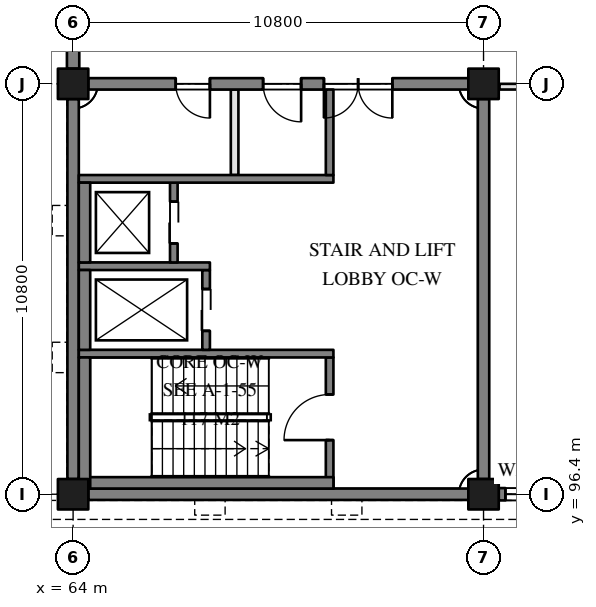
"""IFC4 building model, lengths in metres.
Left out: names, types, materials, properties, quantities, classifications, styles, units other than length and angle.
Written with IfcOpenShell. Run it as: python <this file> out.ifc"""

import sys

from ifc_helpers import new_model, si_unit, direction, frame, frame_2d, origin, origin_2d, place, context, subcontext, project, spatial, rectangle, extrude, element, fill, save


model = new_model("IFC4")
c1 = context("Model", 3, precision=1e-05, world=origin(), true_north=direction((0.0, 1.0)))
c2 = subcontext(c1, "Body", "Model", "MODEL_VIEW")
j1 = project(units=[si_unit("LENGTHUNIT", "METRE"), si_unit("PLANEANGLEUNIT", "RADIAN")], contexts=[c1])
p1 = place(None, origin())
s1 = spatial("IfcSite", under=j1, at=p1, CompositionType="ELEMENT")
p2 = place(p1, origin())
s2 = spatial("IfcBuilding", under=s1, at=p2, CompositionType="ELEMENT")
p3 = place(p2, frame((0.0, 0.0, 12.6)))
s3 = spatial("IfcBuildingStorey", under=s2, at=p3, CompositionType="ELEMENT", Elevation=12.6)
for number, where, z_axis, x_axis in (
    (1, (64.0, 96.4, 0.0), (0.0, 0.0, 1.0), (1.0, 0.0, 0.0)),
    (2, (64.0, 107.2, 0.0), (0.0, 0.0, 1.0), (1.0, 0.0, 0.0)),
    (3, (74.8, 96.4, 0.0), (0.0, 0.0, 1.0), (1.0, 0.0, 0.0)),
    (4, (74.8, 107.2, 0.0), (0.0, 0.0, 1.0), (1.0, 0.0, 0.0)),
):
    element("IfcColumn", number, at=place(p3, frame(where, z_axis=z_axis, x_axis=x_axis)), inside=s3, PredefinedType="COLUMN", context=c2, shape_type="SweptSolid", body=[
        extrude(rectangle(XDim=0.8, YDim=0.8, at=origin_2d()), origin(), (0.0, 0.0, 1.0), 3.9),
    ])
for number, where, z_axis, x_axis in (
    (5, (64.4, 96.4, 0.0), (0.0, 0.0, 1.0), (1.0, 0.0, 0.0)),
    (6, (74.8, 96.8, 0.0), (0.0, 0.0, 1.0), (0.0, 1.0, 0.0)),
):
    element("IfcWall", number, at=place(p3, frame(where, z_axis=z_axis, x_axis=x_axis)), inside=s3, PredefinedType="SOLIDWALL", context=c2, shape_type="SweptSolid", body=[
        extrude(rectangle(XDim=10.0, YDim=0.3, at=frame_2d((5.0, 0.0))), origin(), (0.0, 0.0, 1.0), 3.9),
    ])
p4 = place(p3, frame((74.4, 107.2, 0.0), z_axis=(0.0, 0.0, 1.0), x_axis=(-1.0, 0.0, 0.0)))
e7 = element("IfcWall", 7, at=p4, inside=s3, PredefinedType="SOLIDWALL", context=c2, shape_type="SweptSolid", body=[
    extrude(rectangle(XDim=10.0, YDim=0.3, at=frame_2d((5.0, 0.0))), origin(), (0.0, 0.0, 1.0), 3.9),
])
p5 = place(p4, frame((2.0, 0.0, 0.0)))
e8 = element("IfcOpeningElement", 8, at=p5, cuts=e7, PredefinedType="OPENING", context=c2, shape_type="SweptSolid", body=[
    extrude(rectangle(XDim=1.8, YDim=2.1, at=frame_2d((0.9, 1.05))), frame((0.0, 0.16, 0.0), z_axis=(0.0, -1.0, 0.0), x_axis=(1.0, 0.0, 0.0)), (0.0, 0.0, 1.0), 0.32),
])
p6 = place(p4, frame((4.4, 0.0, 0.0)))
e9 = element("IfcOpeningElement", 9, at=p6, cuts=e7, PredefinedType="OPENING", context=c2, shape_type="SweptSolid", body=[
    extrude(rectangle(XDim=1.0, YDim=2.1, at=frame_2d((0.5, 1.05))), frame((0.0, 0.16, 0.0), z_axis=(0.0, -1.0, 0.0), x_axis=(1.0, 0.0, 0.0)), (0.0, 0.0, 1.0), 0.32),
])
p7 = place(p4, frame((6.8, 0.0, 0.0)))
e10 = element("IfcOpeningElement", 10, at=p7, cuts=e7, PredefinedType="OPENING", context=c2, shape_type="SweptSolid", body=[
    extrude(rectangle(XDim=0.9, YDim=2.1, at=frame_2d((0.45, 1.05))), frame((0.0, 0.16, 0.0), z_axis=(0.0, -1.0, 0.0), x_axis=(1.0, 0.0, 0.0)), (0.0, 0.0, 1.0), 0.32),
])
p8 = place(p3, frame((64.0, 106.8, 0.0), z_axis=(0.0, 0.0, 1.0), x_axis=(0.0, -1.0, 0.0)))
e11 = element("IfcWall", 11, at=p8, inside=s3, PredefinedType="SOLIDWALL", context=c2, shape_type="SweptSolid", body=[
    extrude(rectangle(XDim=10.0, YDim=0.3, at=frame_2d((5.0, 0.0))), origin(), (0.0, 0.0, 1.0), 3.9),
])
p9 = place(p3, frame((75.2, 96.4, 0.0), z_axis=(0.0, 0.0, 1.0), x_axis=(1.0, 0.0, 0.0)))
e12 = element("IfcWall", 12, at=p9, inside=s3, PredefinedType="SOLIDWALL", context=c2, shape_type="SweptSolid", body=[
    extrude(rectangle(XDim=10.0, YDim=0.325, at=frame_2d((5.0, 0.0))), origin(), (0.0, 0.0, 1.0), 2.8),
])
p10 = place(p9, frame((0.175, 0.0, 0.5)))
e13 = element("IfcOpeningElement", 13, at=p10, cuts=e12, PredefinedType="OPENING", context=c2, shape_type="SweptSolid", body=[
    extrude(rectangle(XDim=0.95, YDim=2.25, at=frame_2d((0.475, 1.125))), frame((0.0, 0.172, 0.0), z_axis=(0.0, -1.0, 0.0), x_axis=(1.0, 0.0, 0.0)), (0.0, 0.0, 1.0), 0.345),
])
p11 = place(p9, frame((3.775, 0.0, 0.5)))
e14 = element("IfcOpeningElement", 14, at=p11, cuts=e12, PredefinedType="OPENING", context=c2, shape_type="SweptSolid", body=[
    extrude(rectangle(XDim=0.95, YDim=2.25, at=frame_2d((0.475, 1.125))), frame((0.0, 0.172, 0.0), z_axis=(0.0, -1.0, 0.0), x_axis=(1.0, 0.0, 0.0)), (0.0, 0.0, 1.0), 0.345),
])
p12 = place(p9, frame((7.375, 0.0, 0.5)))
e15 = element("IfcOpeningElement", 15, at=p12, cuts=e12, PredefinedType="OPENING", context=c2, shape_type="SweptSolid", body=[
    extrude(rectangle(XDim=0.95, YDim=2.25, at=frame_2d((0.475, 1.125))), frame((0.0, 0.172, 0.0), z_axis=(0.0, -1.0, 0.0), x_axis=(1.0, 0.0, 0.0)), (0.0, 0.0, 1.0), 0.345),
])
p13 = place(p9, frame((1.675, 0.0, 0.5)))
e16 = element("IfcOpeningElement", 16, at=p13, cuts=e12, PredefinedType="OPENING", context=c2, shape_type="SweptSolid", body=[
    extrude(rectangle(XDim=0.95, YDim=2.25, at=frame_2d((0.475, 1.125))), frame((0.0, 0.172, 0.0), z_axis=(0.0, -1.0, 0.0), x_axis=(1.0, 0.0, 0.0)), (0.0, 0.0, 1.0), 0.345),
])
p14 = place(p9, frame((5.275, 0.0, 0.5)))
e17 = element("IfcOpeningElement", 17, at=p14, cuts=e12, PredefinedType="OPENING", context=c2, shape_type="SweptSolid", body=[
    extrude(rectangle(XDim=0.95, YDim=2.25, at=frame_2d((0.475, 1.125))), frame((0.0, 0.172, 0.0), z_axis=(0.0, -1.0, 0.0), x_axis=(1.0, 0.0, 0.0)), (0.0, 0.0, 1.0), 0.345),
])
p15 = place(p9, frame((8.875, 0.0, 0.5)))
e18 = element("IfcOpeningElement", 18, at=p15, cuts=e12, PredefinedType="OPENING", context=c2, shape_type="SweptSolid", body=[
    extrude(rectangle(XDim=0.95, YDim=2.25, at=frame_2d((0.475, 1.125))), frame((0.0, 0.172, 0.0), z_axis=(0.0, -1.0, 0.0), x_axis=(1.0, 0.0, 0.0)), (0.0, 0.0, 1.0), 0.345),
])
p16 = place(p3, frame((64.0, 107.6, 0.0), z_axis=(0.0, 0.0, 1.0), x_axis=(0.0, 1.0, 0.0)))
e19 = element("IfcWall", 19, at=p16, inside=s3, PredefinedType="SOLIDWALL", context=c2, shape_type="SweptSolid", body=[
    extrude(rectangle(XDim=3.8, YDim=0.325, at=frame_2d((1.9, 0.0))), origin(), (0.0, 0.0, 1.0), 2.8),
])
p17 = place(p16, frame((0.95, 0.0, 0.7)))
e20 = element("IfcOpeningElement", 20, at=p17, cuts=e19, PredefinedType="OPENING", context=c2, shape_type="SweptSolid", body=[
    extrude(rectangle(XDim=0.9, YDim=2.0, at=frame_2d((0.45, 1.0))), frame((0.0, 0.172, 0.0), z_axis=(0.0, -1.0, 0.0), x_axis=(1.0, 0.0, 0.0)), (0.0, 0.0, 1.0), 0.345),
])
p18 = place(p3, frame((70.75, 96.55, 0.0), z_axis=(0.0, 0.0, 1.0), x_axis=(0.0, 1.0, 0.0)))
e21 = element("IfcWall", 21, at=p18, inside=s3, PredefinedType="SOLIDWALL", context=c2, shape_type="SweptSolid", body=[
    extrude(rectangle(XDim=3.45, YDim=0.2, at=frame_2d((1.725, 0.0))), origin(), (0.0, 0.0, 1.0), 3.6),
])
p19 = place(p18, frame((1.275, 0.0, 0.0)))
e22 = element("IfcOpeningElement", 22, at=p19, cuts=e21, PredefinedType="OPENING", context=c2, shape_type="SweptSolid", body=[
    extrude(rectangle(XDim=1.2, YDim=2.1, at=frame_2d((0.6, 1.05))), frame((0.0, 0.11, 0.0), z_axis=(0.0, -1.0, 0.0), x_axis=(1.0, 0.0, 0.0)), (0.0, 0.0, 1.0), 0.22),
])
p20 = place(p3, frame((70.85, 100.1, 0.0), z_axis=(0.0, 0.0, 1.0), x_axis=(-1.0, 0.0, 0.0)))
e23 = element("IfcWall", 23, at=p20, inside=s3, PredefinedType="SOLIDWALL", context=c2, shape_type="SweptSolid", body=[
    extrude(rectangle(XDim=6.7, YDim=0.2, at=frame_2d((3.35, 0.0))), origin(), (0.0, 0.0, 1.0), 3.6),
])
p21 = place(p3, frame((67.5, 100.2, 0.0), z_axis=(0.0, 0.0, 1.0), x_axis=(0.0, 1.0, 0.0)))
e24 = element("IfcWall", 24, at=p21, inside=s3, PredefinedType="SOLIDWALL", context=c2, shape_type="SweptSolid", body=[
    extrude(rectangle(XDim=2.1, YDim=0.2, at=frame_2d((1.05, 0.0))), origin(), (0.0, 0.0, 1.0), 3.6),
])
p22 = place(p21, frame((0.5, 0.0, 0.0)))
e25 = element("IfcOpeningElement", 25, at=p22, cuts=e24, PredefinedType="OPENING", context=c2, shape_type="SweptSolid", body=[
    extrude(rectangle(XDim=1.1, YDim=2.1, at=frame_2d((0.55, 1.05))), frame((0.0, 0.11, 0.0), z_axis=(0.0, -1.0, 0.0), x_axis=(1.0, 0.0, 0.0)), (0.0, 0.0, 1.0), 0.22),
])
p23 = place(p3, frame((67.6, 102.4, 0.0), z_axis=(0.0, 0.0, 1.0), x_axis=(-1.0, 0.0, 0.0)))
e26 = element("IfcWall", 26, at=p23, inside=s3, PredefinedType="SOLIDWALL", context=c2, shape_type="SweptSolid", body=[
    extrude(rectangle(XDim=3.45, YDim=0.2, at=frame_2d((1.725, 0.0))), origin(), (0.0, 0.0, 1.0), 3.6),
])
p24 = place(p3, frame((66.65, 102.5, 0.0), z_axis=(0.0, 0.0, 1.0), x_axis=(0.0, 1.0, 0.0)))
e27 = element("IfcWall", 27, at=p24, inside=s3, PredefinedType="SOLIDWALL", context=c2, shape_type="SweptSolid", body=[
    extrude(rectangle(XDim=2.1, YDim=0.2, at=frame_2d((1.05, 0.0))), origin(), (0.0, 0.0, 1.0), 3.6),
])
p25 = place(p24, frame((0.5, 0.0, 0.0)))
e28 = element("IfcOpeningElement", 28, at=p25, cuts=e27, PredefinedType="OPENING", context=c2, shape_type="SweptSolid", body=[
    extrude(rectangle(XDim=1.1, YDim=2.1, at=frame_2d((0.55, 1.05))), frame((0.0, 0.11, 0.0), z_axis=(0.0, -1.0, 0.0), x_axis=(1.0, 0.0, 0.0)), (0.0, 0.0, 1.0), 0.22),
])
p26 = place(p3, frame((70.85, 104.7, 0.0), z_axis=(0.0, 0.0, 1.0), x_axis=(-1.0, 0.0, 0.0)))
e29 = element("IfcWall", 29, at=p26, inside=s3, PredefinedType="SOLIDWALL", context=c2, shape_type="SweptSolid", body=[
    extrude(rectangle(XDim=6.7, YDim=0.2, at=frame_2d((3.35, 0.0))), origin(), (0.0, 0.0, 1.0), 3.6),
])
p27 = place(p3, frame((70.75, 104.8, 0.0), z_axis=(0.0, 0.0, 1.0), x_axis=(0.0, 1.0, 0.0)))
e30 = element("IfcWall", 30, at=p27, inside=s3, PredefinedType="SOLIDWALL", context=c2, shape_type="SweptSolid", body=[
    extrude(rectangle(XDim=2.25, YDim=0.2, at=frame_2d((1.125, 0.0))), origin(), (0.0, 0.0, 1.0), 3.6),
])
p28 = place(p3, frame((70.85, 96.7, -0.3), z_axis=(0.0, 0.0, 1.0), x_axis=(-1.0, 0.0, 0.0)))
e31 = element("IfcWall", 31, at=p28, inside=s3, PredefinedType="SOLIDWALL", context=c2, shape_type="SweptSolid", body=[
    extrude(rectangle(XDim=6.7, YDim=0.3, at=frame_2d((3.35, 0.0))), origin(), (0.0, 0.0, 1.0), 3.9),
])
p29 = place(p3, frame((64.3, 96.55, -0.3), z_axis=(0.0, 0.0, 1.0), x_axis=(0.0, 1.0, 0.0)))
e32 = element("IfcWall", 32, at=p29, inside=s3, PredefinedType="SOLIDWALL", context=c2, shape_type="SweptSolid", body=[
    extrude(rectangle(XDim=3.45, YDim=0.3, at=frame_2d((1.725, 0.0))), origin(), (0.0, 0.0, 1.0), 3.9),
])
for number, where, z_axis, x_axis in (
    (33, (64.3, 100.2, -0.3), (0.0, 0.0, 1.0), (0.0, 1.0, 0.0)),
    (34, (64.3, 102.5, -0.3), (0.0, 0.0, 1.0), (0.0, 1.0, 0.0)),
):
    element("IfcWall", number, at=place(p3, frame(where, z_axis=z_axis, x_axis=x_axis)), inside=s3, PredefinedType="SOLIDWALL", context=c2, shape_type="SweptSolid", body=[
        extrude(rectangle(XDim=2.1, YDim=0.3, at=frame_2d((1.05, 0.0))), origin(), (0.0, 0.0, 1.0), 3.9),
    ])
p30 = place(p3, frame((68.25, 104.8, 0.0), z_axis=(0.0, 0.0, 1.0), x_axis=(0.0, 1.0, 0.0)))
e35 = element("IfcWall", 35, at=p30, inside=s3, PredefinedType="PARTITIONING", context=c2, shape_type="SweptSolid", body=[
    extrude(rectangle(XDim=2.25, YDim=0.2, at=frame_2d((1.125, 0.0))), origin(), (0.0, 0.0, 1.0), 3.6),
])
p31 = place(p3, frame((75.22, 107.125, 0.0), z_axis=(0.0, 0.0, 1.0), x_axis=(1.0, 0.0, 0.0)))
e36 = element("IfcWall", 36, at=p31, inside=s3, PredefinedType="PARTITIONING", context=c2, shape_type="SweptSolid", body=[
    extrude(rectangle(XDim=9.96, YDim=0.15, at=frame_2d((4.98, 0.0))), origin(), (0.0, 0.0, 1.0), 2.8),
])
p32 = place(p10, origin())
e37 = element("IfcWindow", 37, at=p32, inside=s3, PartitioningType="SINGLE_PANEL", PredefinedType="WINDOW", context=c2, shape_type="SweptSolid", body=[
    extrude(rectangle(XDim=0.95, YDim=2.25, at=frame_2d((0.475, 1.125))), frame((0.0, 0.03, 0.0), z_axis=(0.0, -1.0, 0.0), x_axis=(1.0, 0.0, 0.0)), (0.0, 0.0, 1.0), 0.06),
])
fill(e13, e37)
p33 = place(p22, frame((1.1, 0.0, 0.0), z_axis=(0.0, 0.0, 1.0), x_axis=(-1.0, 0.0, 0.0)))
e38 = element("IfcDoor", 38, at=p33, inside=s3, OperationType="DOUBLE_DOOR_SLIDING", PredefinedType="DOOR", context=c2, shape_type="SweptSolid", body=[
    extrude(rectangle(XDim=1.1, YDim=2.1, at=frame_2d((0.55, 1.05))), frame((0.0, 0.025, 0.0), z_axis=(0.0, -1.0, 0.0), x_axis=(1.0, 0.0, 0.0)), (0.0, 0.0, 1.0), 0.05),
])
fill(e25, e38)
p34 = place(p25, frame((1.1, 0.0, 0.0), z_axis=(0.0, 0.0, 1.0), x_axis=(-1.0, 0.0, 0.0)))
e39 = element("IfcDoor", 39, at=p34, inside=s3, OperationType="DOUBLE_DOOR_SLIDING", PredefinedType="DOOR", context=c2, shape_type="SweptSolid", body=[
    extrude(rectangle(XDim=1.1, YDim=2.1, at=frame_2d((0.55, 1.05))), frame((0.0, 0.025, 0.0), z_axis=(0.0, -1.0, 0.0), x_axis=(1.0, 0.0, 0.0)), (0.0, 0.0, 1.0), 0.05),
])
fill(e28, e39)
p35 = place(p19, frame((1.2, 0.0, 0.0), z_axis=(0.0, 0.0, 1.0), x_axis=(-1.0, 0.0, 0.0)))
e40 = element("IfcDoor", 40, at=p35, inside=s3, OperationType="SINGLE_SWING_LEFT", PredefinedType="DOOR", context=c2, shape_type="SweptSolid", body=[
    extrude(rectangle(XDim=1.2, YDim=2.1, at=frame_2d((0.6, 1.05))), frame((0.0, 0.025, 0.0), z_axis=(0.0, -1.0, 0.0), x_axis=(1.0, 0.0, 0.0)), (0.0, 0.0, 1.0), 0.05),
])
fill(e22, e40)
p36 = place(p5, frame((1.8, 0.0, 0.0), z_axis=(0.0, 0.0, 1.0), x_axis=(-1.0, 0.0, 0.0)))
e41 = element("IfcDoor", 41, at=p36, inside=s3, OperationType="DOUBLE_DOOR_DOUBLE_SWING", PredefinedType="DOOR", context=c2, shape_type="SweptSolid", body=[
    extrude(rectangle(XDim=1.8, YDim=2.1, at=frame_2d((0.9, 1.05))), frame((0.0, 0.025, 0.0), z_axis=(0.0, -1.0, 0.0), x_axis=(1.0, 0.0, 0.0)), (0.0, 0.0, 1.0), 0.05),
])
fill(e8, e41)
p37 = place(p6, origin())
e42 = element("IfcDoor", 42, at=p37, inside=s3, OperationType="SINGLE_SWING_LEFT", PredefinedType="DOOR", context=c2, shape_type="SweptSolid", body=[
    extrude(rectangle(XDim=1.0, YDim=2.1, at=frame_2d((0.5, 1.05))), frame((0.0, 0.025, 0.0), z_axis=(0.0, -1.0, 0.0), x_axis=(1.0, 0.0, 0.0)), (0.0, 0.0, 1.0), 0.05),
])
fill(e9, e42)
p38 = place(p7, origin())
e43 = element("IfcDoor", 43, at=p38, inside=s3, OperationType="SINGLE_SWING_RIGHT", PredefinedType="DOOR", context=c2, shape_type="SweptSolid", body=[
    extrude(rectangle(XDim=0.9, YDim=2.1, at=frame_2d((0.45, 1.05))), frame((0.0, 0.025, 0.0), z_axis=(0.0, -1.0, 0.0), x_axis=(1.0, 0.0, 0.0)), (0.0, 0.0, 1.0), 0.05),
])
fill(e10, e43)
save(model, sys.argv[1])
